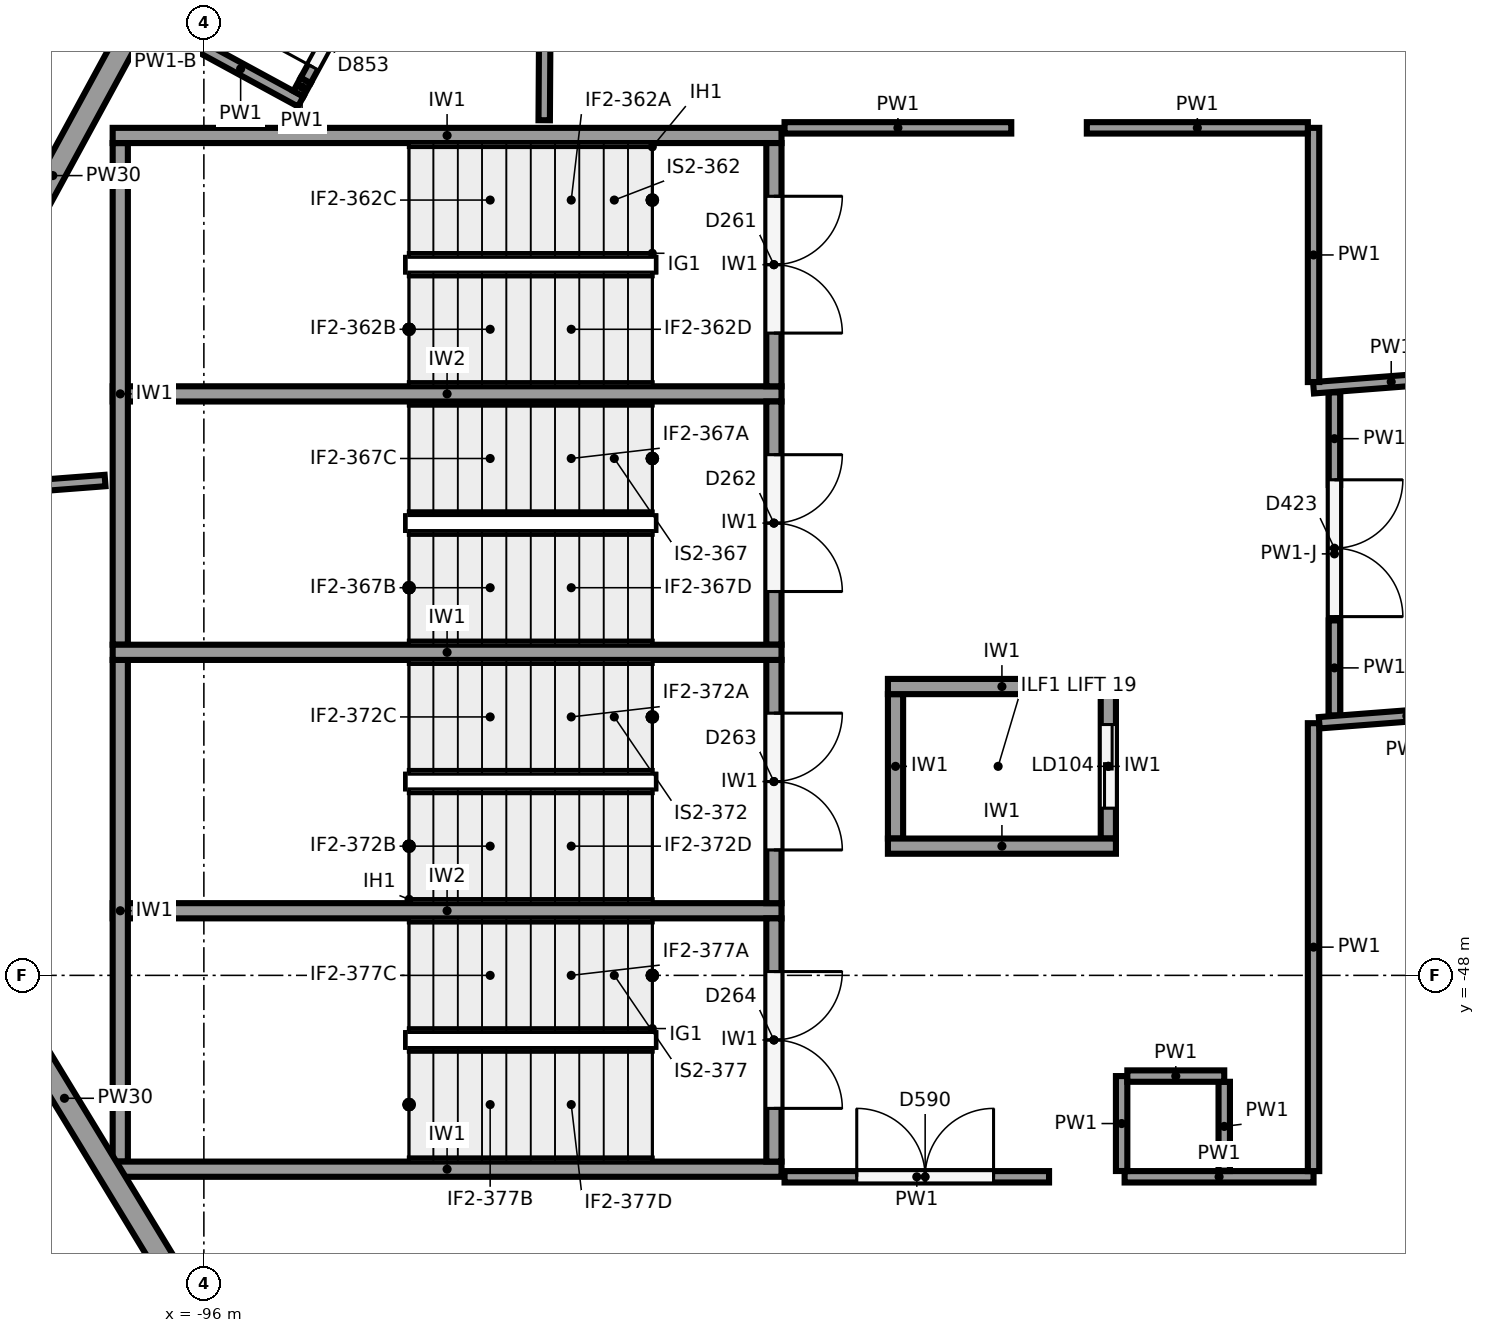
"""IFC4 building model, lengths in metres.
Left out: names, types, materials, properties, quantities, classifications, styles, units other than length and angle.
Written with IfcOpenShell. Run it as: python <this file> out.ifc"""

import sys

from ifc_helpers import new_model, si_unit, direction, frame, frame_2d, origin, origin_2d, place, context, subcontext, project, spatial, rectangle, circle, extrude, element, fill, save


model = new_model("IFC4")
c1 = context("Model", 3, precision=1e-05, world=origin(), true_north=direction((0.0, 1.0)))
c2 = subcontext(c1, "Body", "Model", "MODEL_VIEW")
j1 = project(units=[si_unit("LENGTHUNIT", "METRE"), si_unit("PLANEANGLEUNIT", "RADIAN")], contexts=[c1])
p1 = place(None, origin())
s1 = spatial("IfcSite", under=j1, at=p1, CompositionType="ELEMENT")
p2 = place(p1, origin())
s2 = spatial("IfcBuilding", under=s1, at=p2, CompositionType="ELEMENT")
p3 = place(p2, origin())
s3 = spatial("IfcBuildingStorey", under=s2, at=p3, CompositionType="ELEMENT", Elevation=0.0)
p4 = place(p3, frame((-84.884, -42.562, 0.0), z_axis=(0.0, 0.0, 1.0), x_axis=(1.0, 0.0, 0.0)))
e1 = element("IfcColumn", 1, at=p4, inside=s3, PredefinedType="COLUMN", context=c2, shape_type="SweptSolid", body=[
    extrude(circle(Radius=0.6, at=origin_2d()), origin(), (0.0, 0.0, 1.0), 6.5),
])
p5 = place(p3, frame((-101.161, -43.311, 0.0), z_axis=(0.0, 0.0, 1.0), x_axis=(0.477867771117, 0.878431780691, 0.0)))
e2 = element("IfcWall", 2, at=p5, inside=s3, PredefinedType="SOLIDWALL", context=c2, shape_type="SweptSolid", body=[
    extrude(rectangle(XDim=13.28, YDim=0.3, at=frame_2d((6.64, 0.0))), origin(), (0.0, 0.0, 1.0), 4.85),
])
p6 = place(p5, frame((9.53, 0.0, 0.0)))
e3 = element("IfcOpeningElement", 3, at=p6, cuts=e2, PredefinedType="OPENING", context=c2, shape_type="SweptSolid", body=[
    extrude(rectangle(XDim=1.8, YDim=2.4, at=frame_2d((0.9, 1.2))), frame((0.0, 0.16, 0.0), z_axis=(0.0, -1.0, 0.0), x_axis=(1.0, 0.0, 0.0)), (0.0, 0.0, 1.0), 0.32),
])
p7 = place(p3, frame((-94.528, -55.057, 0.0), z_axis=(0.0, 0.0, 1.0), x_axis=(-0.519362860044, 0.854553813172, 0.0)))
e4 = element("IfcWall", 4, at=p7, inside=s3, PredefinedType="SOLIDWALL", context=c2, shape_type="SweptSolid", body=[
    extrude(rectangle(XDim=12.732, YDim=0.3, at=frame_2d((6.366, 0.0))), origin(), (0.0, 0.0, 1.0), 4.85),
])
for number, where, z_axis, x_axis in (
    (5, (-97.2, -36.95, 0.0), (0.0, 0.0, 1.0), (1.0, 0.0, 0.0)),
    (6, (-97.2, -43.75, 0.0), (0.0, 0.0, 1.0), (1.0, 0.0, 0.0)),
    (7, (-97.2, -50.55, 0.0), (0.0, 0.0, 1.0), (1.0, 0.0, 0.0)),
):
    element("IfcWall", number, at=place(p3, frame(where, z_axis=z_axis, x_axis=x_axis)), inside=s3, PredefinedType="SHEAR", context=c2, shape_type="SweptSolid", body=[
        extrude(rectangle(XDim=8.8, YDim=0.2, at=frame_2d((4.4, 0.0))), origin(), (0.0, 0.0, 1.0), 6.15),
    ])
for number, where, z_axis, x_axis in (
    (8, (-97.1, -37.05, 0.0), (0.0, 0.0, 1.0), (0.0, -1.0, 0.0)),
    (9, (-97.1, -43.85, 0.0), (0.0, 0.0, 1.0), (0.0, -1.0, 0.0)),
):
    element("IfcWall", number, at=place(p3, frame(where, z_axis=z_axis, x_axis=x_axis)), inside=s3, PredefinedType="SHEAR", context=c2, shape_type="SweptSolid", body=[
        extrude(rectangle(XDim=6.6, YDim=0.2, at=frame_2d((3.3, 0.0))), origin(), (0.0, 0.0, 1.0), 6.15),
    ])
for number, where, z_axis, x_axis in (
    (10, (-97.2, -40.35, 0.0), (0.0, 0.0, 1.0), (1.0, 0.0, 0.0)),
    (11, (-97.2, -47.15, 0.0), (0.0, 0.0, 1.0), (1.0, 0.0, 0.0)),
):
    element("IfcWall", number, at=place(p3, frame(where, z_axis=z_axis, x_axis=x_axis)), inside=s3, PredefinedType="SHEAR", context=c2, shape_type="SweptSolid", body=[
        extrude(rectangle(XDim=8.8, YDim=0.2, at=frame_2d((4.4, 0.0))), origin(), (0.0, 0.0, 1.0), 6.15),
    ])
p8 = place(p3, frame((-88.5, -37.05, 0.0), z_axis=(0.0, 0.0, 1.0), x_axis=(0.0, -1.0, 0.0)))
e12 = element("IfcWall", 12, at=p8, inside=s3, PredefinedType="SHEAR", context=c2, shape_type="SweptSolid", body=[
    extrude(rectangle(XDim=3.2, YDim=0.2, at=frame_2d((1.6, 0.0))), origin(), (0.0, 0.0, 1.0), 6.15),
])
p9 = place(p8, frame((0.7, 0.0, 0.0)))
e13 = element("IfcOpeningElement", 13, at=p9, cuts=e12, PredefinedType="OPENING", context=c2, shape_type="SweptSolid", body=[
    extrude(rectangle(XDim=1.8, YDim=2.1, at=frame_2d((0.9, 1.05))), frame((0.0, 0.11, 0.0), z_axis=(0.0, -1.0, 0.0), x_axis=(1.0, 0.0, 0.0)), (0.0, 0.0, 1.0), 0.22),
])
p10 = place(p3, frame((-88.5, -40.45, 0.0), z_axis=(0.0, 0.0, 1.0), x_axis=(0.0, -1.0, 0.0)))
e14 = element("IfcWall", 14, at=p10, inside=s3, PredefinedType="SHEAR", context=c2, shape_type="SweptSolid", body=[
    extrude(rectangle(XDim=3.2, YDim=0.2, at=frame_2d((1.6, 0.0))), origin(), (0.0, 0.0, 1.0), 6.15),
])
p11 = place(p10, frame((0.7, 0.0, 0.0)))
e15 = element("IfcOpeningElement", 15, at=p11, cuts=e14, PredefinedType="OPENING", context=c2, shape_type="SweptSolid", body=[
    extrude(rectangle(XDim=1.8, YDim=2.1, at=frame_2d((0.9, 1.05))), frame((0.0, 0.11, 0.0), z_axis=(0.0, -1.0, 0.0), x_axis=(1.0, 0.0, 0.0)), (0.0, 0.0, 1.0), 0.22),
])
p12 = place(p3, frame((-88.5, -43.85, 0.0), z_axis=(0.0, 0.0, 1.0), x_axis=(0.0, -1.0, 0.0)))
e16 = element("IfcWall", 16, at=p12, inside=s3, PredefinedType="SHEAR", context=c2, shape_type="SweptSolid", body=[
    extrude(rectangle(XDim=3.2, YDim=0.2, at=frame_2d((1.6, 0.0))), origin(), (0.0, 0.0, 1.0), 6.15),
])
p13 = place(p12, frame((0.7, 0.0, 0.0)))
e17 = element("IfcOpeningElement", 17, at=p13, cuts=e16, PredefinedType="OPENING", context=c2, shape_type="SweptSolid", body=[
    extrude(rectangle(XDim=1.8, YDim=2.1, at=frame_2d((0.9, 1.05))), frame((0.0, 0.11, 0.0), z_axis=(0.0, -1.0, 0.0), x_axis=(1.0, 0.0, 0.0)), (0.0, 0.0, 1.0), 0.22),
])
p14 = place(p3, frame((-88.5, -47.25, 0.0), z_axis=(0.0, 0.0, 1.0), x_axis=(0.0, -1.0, 0.0)))
e18 = element("IfcWall", 18, at=p14, inside=s3, PredefinedType="SHEAR", context=c2, shape_type="SweptSolid", body=[
    extrude(rectangle(XDim=3.2, YDim=0.2, at=frame_2d((1.6, 0.0))), origin(), (0.0, 0.0, 1.0), 6.15),
])
p15 = place(p14, frame((0.7, 0.0, 0.0)))
e19 = element("IfcOpeningElement", 19, at=p15, cuts=e18, PredefinedType="OPENING", context=c2, shape_type="SweptSolid", body=[
    extrude(rectangle(XDim=1.8, YDim=2.1, at=frame_2d((0.9, 1.05))), frame((0.0, 0.11, 0.0), z_axis=(0.0, -1.0, 0.0), x_axis=(1.0, 0.0, 0.0)), (0.0, 0.0, 1.0), 0.22),
])
for number, where, z_axis, x_axis in (
    (20, (-87.0, -44.2, 0.0), (0.0, 0.0, 1.0), (1.0, 0.0, 0.0)),
    (21, (-87.0, -46.3, 0.0), (0.0, 0.0, 1.0), (1.0, 0.0, 0.0)),
):
    element("IfcWall", number, at=place(p3, frame(where, z_axis=z_axis, x_axis=x_axis)), inside=s3, PredefinedType="SHEAR", context=c2, shape_type="SweptSolid", body=[
        extrude(rectangle(XDim=3.0, YDim=0.2, at=frame_2d((1.5, 0.0))), origin(), (0.0, 0.0, 1.0), 6.15),
    ])
p16 = place(p3, frame((-86.9, -44.3, 0.0), z_axis=(0.0, 0.0, 1.0), x_axis=(0.0, -1.0, 0.0)))
e22 = element("IfcWall", 22, at=p16, inside=s3, PredefinedType="SHEAR", context=c2, shape_type="SweptSolid", body=[
    extrude(rectangle(XDim=1.9, YDim=0.2, at=frame_2d((0.95, 0.0))), origin(), (0.0, 0.0, 1.0), 6.15),
])
p17 = place(p3, frame((-84.1, -44.3, 0.0), z_axis=(0.0, 0.0, 1.0), x_axis=(0.0, -1.0, 0.0)))
e23 = element("IfcWall", 23, at=p17, inside=s3, PredefinedType="SHEAR", context=c2, shape_type="SweptSolid", body=[
    extrude(rectangle(XDim=1.9, YDim=0.2, at=frame_2d((0.95, 0.0))), origin(), (0.0, 0.0, 1.0), 6.15),
])
p18 = place(p17, frame((0.4, 0.0, 0.0)))
e24 = element("IfcOpeningElement", 24, at=p18, cuts=e23, PredefinedType="OPENING", context=c2, shape_type="SweptSolid", body=[
    extrude(rectangle(XDim=1.1, YDim=2.1, at=frame_2d((0.55, 1.05))), frame((0.0, 0.11, 0.0), z_axis=(0.0, -1.0, 0.0), x_axis=(1.0, 0.0, 0.0)), (0.0, 0.0, 1.0), 0.22),
])
p19 = place(p3, frame((-91.522, -36.75, 0.0), z_axis=(0.0, 0.0, 1.0), x_axis=(0.006125459352, 0.999981239198, 0.0)))
e25 = element("IfcWall", 25, at=p19, inside=s3, PredefinedType="PARTITIONING", context=c2, shape_type="SweptSolid", body=[
    extrude(rectangle(XDim=5.261, YDim=0.15, at=frame_2d((2.63, 0.0))), origin(), (0.0, 0.0, 1.0), 6.15),
])
p20 = place(p3, frame((-79.356, -40.113, 0.0), z_axis=(0.0, 0.0, 1.0), x_axis=(-0.997072672084, -0.076459705623, 0.0)))
e26 = element("IfcWall", 26, at=p20, inside=s3, PredefinedType="PARTITIONING", context=c2, shape_type="SweptSolid", body=[
    extrude(rectangle(XDim=2.05, YDim=0.15, at=frame_2d((1.025, 0.0))), origin(), (0.0, 0.0, 1.0), 6.15),
])
p21 = place(p3, frame((-81.4, -40.194, 0.0), z_axis=(0.0, 0.0, 1.0), x_axis=(0.0, 1.0, 0.0)))
e27 = element("IfcWall", 27, at=p21, inside=s3, PredefinedType="PARTITIONING", context=c2, shape_type="SweptSolid", body=[
    extrude(rectangle(XDim=3.344, YDim=0.15, at=frame_2d((1.672, 0.0))), origin(), (0.0, 0.0, 1.0), 6.15),
])
p22 = place(p3, frame((-81.475, -36.85, 0.0), z_axis=(0.0, 0.0, 1.0), x_axis=(-1.0, 0.0, 0.0)))
e28 = element("IfcWall", 28, at=p22, inside=s3, PredefinedType="PARTITIONING", context=c2, shape_type="SweptSolid", body=[
    extrude(rectangle(XDim=2.908, YDim=0.15, at=frame_2d((1.454, 0.0))), origin(), (0.0, 0.0, 1.0), 6.15),
])
p23 = place(p3, frame((-85.377, -36.85, 0.0), z_axis=(0.0, 0.0, 1.0), x_axis=(-1.0, 0.0, 0.0)))
e29 = element("IfcWall", 29, at=p23, inside=s3, PredefinedType="PARTITIONING", context=c2, shape_type="SweptSolid", body=[
    extrude(rectangle(XDim=2.983, YDim=0.15, at=frame_2d((1.491, 0.0))), origin(), (0.0, 0.0, 1.0), 6.15),
])
p24 = place(p3, frame((-97.3, -41.49, 0.0), z_axis=(0.0, 0.0, 1.0), x_axis=(-0.99706720675, -0.076530942913, 0.0)))
e30 = element("IfcWall", 30, at=p24, inside=s3, PredefinedType="PARTITIONING", context=c2, shape_type="SweptSolid", body=[
    extrude(rectangle(XDim=2.255, YDim=0.15, at=frame_2d((1.128, 0.0))), origin(), (0.0, 0.0, 1.0), 6.15),
])
p25 = place(p3, frame((-88.36, -50.65, 0.0), z_axis=(0.0, 0.0, 1.0), x_axis=(1.0, 0.0, 0.0)))
e31 = element("IfcWall", 31, at=p25, inside=s3, PredefinedType="PARTITIONING", context=c2, shape_type="SweptSolid", body=[
    extrude(rectangle(XDim=3.48, YDim=0.15, at=frame_2d((1.74, 0.0))), origin(), (0.0, 0.0, 1.0), 6.15),
])
p26 = place(p25, frame((0.95, 0.0, 0.0)))
e32 = element("IfcOpeningElement", 32, at=p26, cuts=e31, PredefinedType="OPENING", context=c2, shape_type="SweptSolid", body=[
    extrude(rectangle(XDim=1.8, YDim=2.1, at=frame_2d((0.9, 1.05))), frame((0.0, 0.085, 0.0), z_axis=(0.0, -1.0, 0.0), x_axis=(1.0, 0.0, 0.0)), (0.0, 0.0, 1.0), 0.17),
])
p27 = place(p3, frame((-83.886, -50.65, 0.0), z_axis=(0.0, 0.0, 1.0), x_axis=(1.0, 0.0, 0.0)))
e33 = element("IfcWall", 33, at=p27, inside=s3, PredefinedType="PARTITIONING", context=c2, shape_type="SweptSolid", body=[
    extrude(rectangle(XDim=2.486, YDim=0.15, at=frame_2d((1.243, 0.0))), origin(), (0.0, 0.0, 1.0), 6.15),
])
p28 = place(p3, frame((-81.4, -50.575, 0.0), z_axis=(0.0, 0.0, 1.0), x_axis=(0.0, 1.0, 0.0)))
e34 = element("IfcWall", 34, at=p28, inside=s3, PredefinedType="PARTITIONING", context=c2, shape_type="SweptSolid", body=[
    extrude(rectangle(XDim=5.893, YDim=0.15, at=frame_2d((2.946, 0.0))), origin(), (0.0, 0.0, 1.0), 6.15),
])
p29 = place(p3, frame((-81.325, -44.677, 0.0), z_axis=(0.0, 0.0, 1.0), x_axis=(0.997066273449, 0.076543101255, 0.0)))
e35 = element("IfcWall", 35, at=p29, inside=s3, PredefinedType="PARTITIONING", context=c2, shape_type="SweptSolid", body=[
    extrude(rectangle(XDim=2.312, YDim=0.15, at=frame_2d((1.156, 0.0))), origin(), (0.0, 0.0, 1.0), 6.15),
])
p30 = place(p3, frame((-83.925, -49.325, 0.0), z_axis=(0.0, 0.0, 1.0), x_axis=(0.0, -1.0, 0.0)))
e36 = element("IfcWall", 36, at=p30, inside=s3, PredefinedType="PARTITIONING", context=c2, shape_type="SweptSolid", body=[
    extrude(rectangle(XDim=1.249, YDim=0.15, at=frame_2d((0.625, 0.0))), origin(), (0.0, 0.0, 1.0), 6.15),
])
p31 = place(p3, frame((-82.575, -50.574, 0.0), z_axis=(0.0, 0.0, 1.0), x_axis=(0.0, 1.0, 0.0)))
e37 = element("IfcWall", 37, at=p31, inside=s3, PredefinedType="PARTITIONING", context=c2, shape_type="SweptSolid", body=[
    extrude(rectangle(XDim=1.174, YDim=0.15, at=frame_2d((0.587, 0.0))), origin(), (0.0, 0.0, 1.0), 6.15),
])
p32 = place(p3, frame((-82.575, -49.325, 0.0), z_axis=(0.0, 0.0, 1.0), x_axis=(-1.0, 0.0, 0.0)))
e38 = element("IfcWall", 38, at=p32, inside=s3, PredefinedType="PARTITIONING", context=c2, shape_type="SweptSolid", body=[
    extrude(rectangle(XDim=1.275, YDim=0.15, at=frame_2d((0.638, 0.0))), origin(), (0.0, 0.0, 1.0), 6.15),
])
p33 = place(p3, frame((-96.307, -35.643, 0.0), z_axis=(0.0, 0.0, 1.0), x_axis=(0.878428962466, -0.477872951632, 0.0)))
e39 = element("IfcWall", 39, at=p33, inside=s3, PredefinedType="PARTITIONING", context=c2, shape_type="SweptSolid", body=[
    extrude(rectangle(XDim=1.8, YDim=0.15, at=frame_2d((0.9, 0.0))), origin(), (0.0, 0.0, 1.0), 6.15),
])
p34 = place(p3, frame((-94.756, -36.402, 0.0), z_axis=(0.0, 0.0, 1.0), x_axis=(0.478168266369, 0.878268244352, 0.0)))
e40 = element("IfcWall", 40, at=p34, inside=s3, PredefinedType="PARTITIONING", context=c2, shape_type="SweptSolid", body=[
    extrude(rectangle(XDim=0.2, YDim=0.15, at=frame_2d((0.1, 0.0))), origin(), (0.0, 0.0, 1.0), 6.15),
])
p35 = place(p3, frame((-94.66, -36.226, 0.0), z_axis=(0.0, 0.0, 1.0), x_axis=(0.477887643273, 0.878420969927, 0.0)))
e41 = element("IfcWall", 41, at=p35, inside=s3, PredefinedType="PARTITIONING", context=c2, shape_type="SweptSolid", body=[
    extrude(rectangle(XDim=2.2, YDim=0.15, at=frame_2d((1.1, 0.0))), origin(), (0.0, 0.0, 1.0), 6.15),
])
p36 = place(p35, frame((0.2, 0.0, 0.0)))
e42 = element("IfcOpeningElement", 42, at=p36, cuts=e41, PredefinedType="OPENING", context=c2, shape_type="SweptSolid", body=[
    extrude(rectangle(XDim=1.0, YDim=2.1, at=frame_2d((0.5, 1.05))), frame((0.0, 0.085, 0.0), z_axis=(0.0, -1.0, 0.0), x_axis=(1.0, 0.0, 0.0)), (0.0, 0.0, 1.0), 0.17),
])
p37 = place(p3, frame((-81.125, -40.33, 0.0), z_axis=(0.0, 0.0, 1.0), x_axis=(0.0, -1.0, 0.0)))
e43 = element("IfcWall", 43, at=p37, inside=s3, PredefinedType="PARTITIONING", context=c2, shape_type="SweptSolid", body=[
    extrude(rectangle(XDim=4.249, YDim=0.15, at=frame_2d((2.125, 0.0))), origin(), (0.0, 0.0, 1.0), 5.05),
])
p38 = place(p37, frame((1.15, 0.0, 0.0)))
e44 = element("IfcOpeningElement", 44, at=p38, cuts=e43, PredefinedType="OPENING", context=c2, shape_type="SweptSolid", body=[
    extrude(rectangle(XDim=1.8, YDim=2.1, at=frame_2d((0.9, 1.05))), frame((0.0, 0.085, 0.0), z_axis=(0.0, -1.0, 0.0), x_axis=(1.0, 0.0, 0.0)), (0.0, 0.0, 1.0), 0.17),
])
p39 = place(p3, frame((-81.125, -40.33, 5.05), z_axis=(0.0, 0.0, 1.0), x_axis=(0.0, -1.0, 0.0)))
e45 = element("IfcWall", 45, at=p39, inside=s3, PredefinedType="PARTITIONING", context=c2, shape_type="SweptSolid", body=[
    extrude(rectangle(XDim=1.218, YDim=0.15, at=frame_2d((0.609, 0.0))), origin(), (0.0, 0.0, 1.0), 1.1),
])
p40 = place(p3, frame((-81.125, -43.33, 5.05), z_axis=(0.0, 0.0, 1.0), x_axis=(0.0, -1.0, 0.0)))
e46 = element("IfcWall", 46, at=p40, inside=s3, PredefinedType="PARTITIONING", context=c2, shape_type="SweptSolid", body=[
    extrude(rectangle(XDim=1.249, YDim=0.15, at=frame_2d((0.625, 0.0))), origin(), (0.0, 0.0, 1.0), 1.1),
])
p41 = place(p9, origin())
e47 = element("IfcDoor", 47, at=p41, inside=s3, OperationType="DOUBLE_DOOR_SINGLE_SWING", PredefinedType="DOOR", context=c2, shape_type="SweptSolid", body=[
    extrude(rectangle(XDim=1.8, YDim=2.1, at=frame_2d((0.9, 1.05))), frame((0.0, 0.025, 0.0), z_axis=(0.0, -1.0, 0.0), x_axis=(1.0, 0.0, 0.0)), (0.0, 0.0, 1.0), 0.05),
])
fill(e13, e47)
p42 = place(p11, origin())
e48 = element("IfcDoor", 48, at=p42, inside=s3, OperationType="DOUBLE_DOOR_SINGLE_SWING", PredefinedType="DOOR", context=c2, shape_type="SweptSolid", body=[
    extrude(rectangle(XDim=1.8, YDim=2.1, at=frame_2d((0.9, 1.05))), frame((0.0, 0.025, 0.0), z_axis=(0.0, -1.0, 0.0), x_axis=(1.0, 0.0, 0.0)), (0.0, 0.0, 1.0), 0.05),
])
fill(e15, e48)
p43 = place(p13, origin())
e49 = element("IfcDoor", 49, at=p43, inside=s3, OperationType="DOUBLE_DOOR_SINGLE_SWING", PredefinedType="DOOR", context=c2, shape_type="SweptSolid", body=[
    extrude(rectangle(XDim=1.8, YDim=2.1, at=frame_2d((0.9, 1.05))), frame((0.0, 0.025, 0.0), z_axis=(0.0, -1.0, 0.0), x_axis=(1.0, 0.0, 0.0)), (0.0, 0.0, 1.0), 0.05),
])
fill(e17, e49)
p44 = place(p15, origin())
e50 = element("IfcDoor", 50, at=p44, inside=s3, OperationType="DOUBLE_DOOR_SINGLE_SWING", PredefinedType="DOOR", context=c2, shape_type="SweptSolid", body=[
    extrude(rectangle(XDim=1.8, YDim=2.1, at=frame_2d((0.9, 1.05))), frame((0.0, 0.025, 0.0), z_axis=(0.0, -1.0, 0.0), x_axis=(1.0, 0.0, 0.0)), (0.0, 0.0, 1.0), 0.05),
])
fill(e19, e50)
p45 = place(p18, origin())
e51 = element("IfcDoor", 51, at=p45, inside=s3, OperationType="SLIDING_TO_RIGHT", PredefinedType="DOOR", context=c2, shape_type="SweptSolid", body=[
    extrude(rectangle(XDim=1.1, YDim=2.1, at=frame_2d((0.55, 1.05))), frame((0.0, 0.025, 0.0), z_axis=(0.0, -1.0, 0.0), x_axis=(1.0, 0.0, 0.0)), (0.0, 0.0, 1.0), 0.05),
])
fill(e24, e51)
p46 = place(p26, origin())
e52 = element("IfcDoor", 52, at=p46, inside=s3, OperationType="DOUBLE_DOOR_SINGLE_SWING", PredefinedType="DOOR", context=c2, shape_type="SweptSolid", body=[
    extrude(rectangle(XDim=1.8, YDim=2.1, at=frame_2d((0.9, 1.05))), frame((0.0, 0.025, 0.0), z_axis=(0.0, -1.0, 0.0), x_axis=(1.0, 0.0, 0.0)), (0.0, 0.0, 1.0), 0.05),
])
fill(e32, e52)
p47 = place(p36, origin())
e53 = element("IfcDoor", 53, at=p47, inside=s3, OperationType="SINGLE_SWING_LEFT", PredefinedType="DOOR", context=c2, shape_type="SweptSolid", body=[
    extrude(rectangle(XDim=1.0, YDim=2.1, at=frame_2d((0.5, 1.05))), frame((0.0, 0.025, 0.0), z_axis=(0.0, -1.0, 0.0), x_axis=(1.0, 0.0, 0.0)), (0.0, 0.0, 1.0), 0.05),
])
fill(e42, e53)
p48 = place(p38, origin())
e54 = element("IfcDoor", 54, at=p48, inside=s3, OperationType="DOUBLE_DOOR_SINGLE_SWING", PredefinedType="DOOR", context=c2, shape_type="SweptSolid", body=[
    extrude(rectangle(XDim=1.8, YDim=2.1, at=frame_2d((0.9, 1.05))), frame((0.0, 0.025, 0.0), z_axis=(0.0, -1.0, 0.0), x_axis=(1.0, 0.0, 0.0)), (0.0, 0.0, 1.0), 0.05),
])
fill(e44, e54)
save(model, sys.argv[1])
